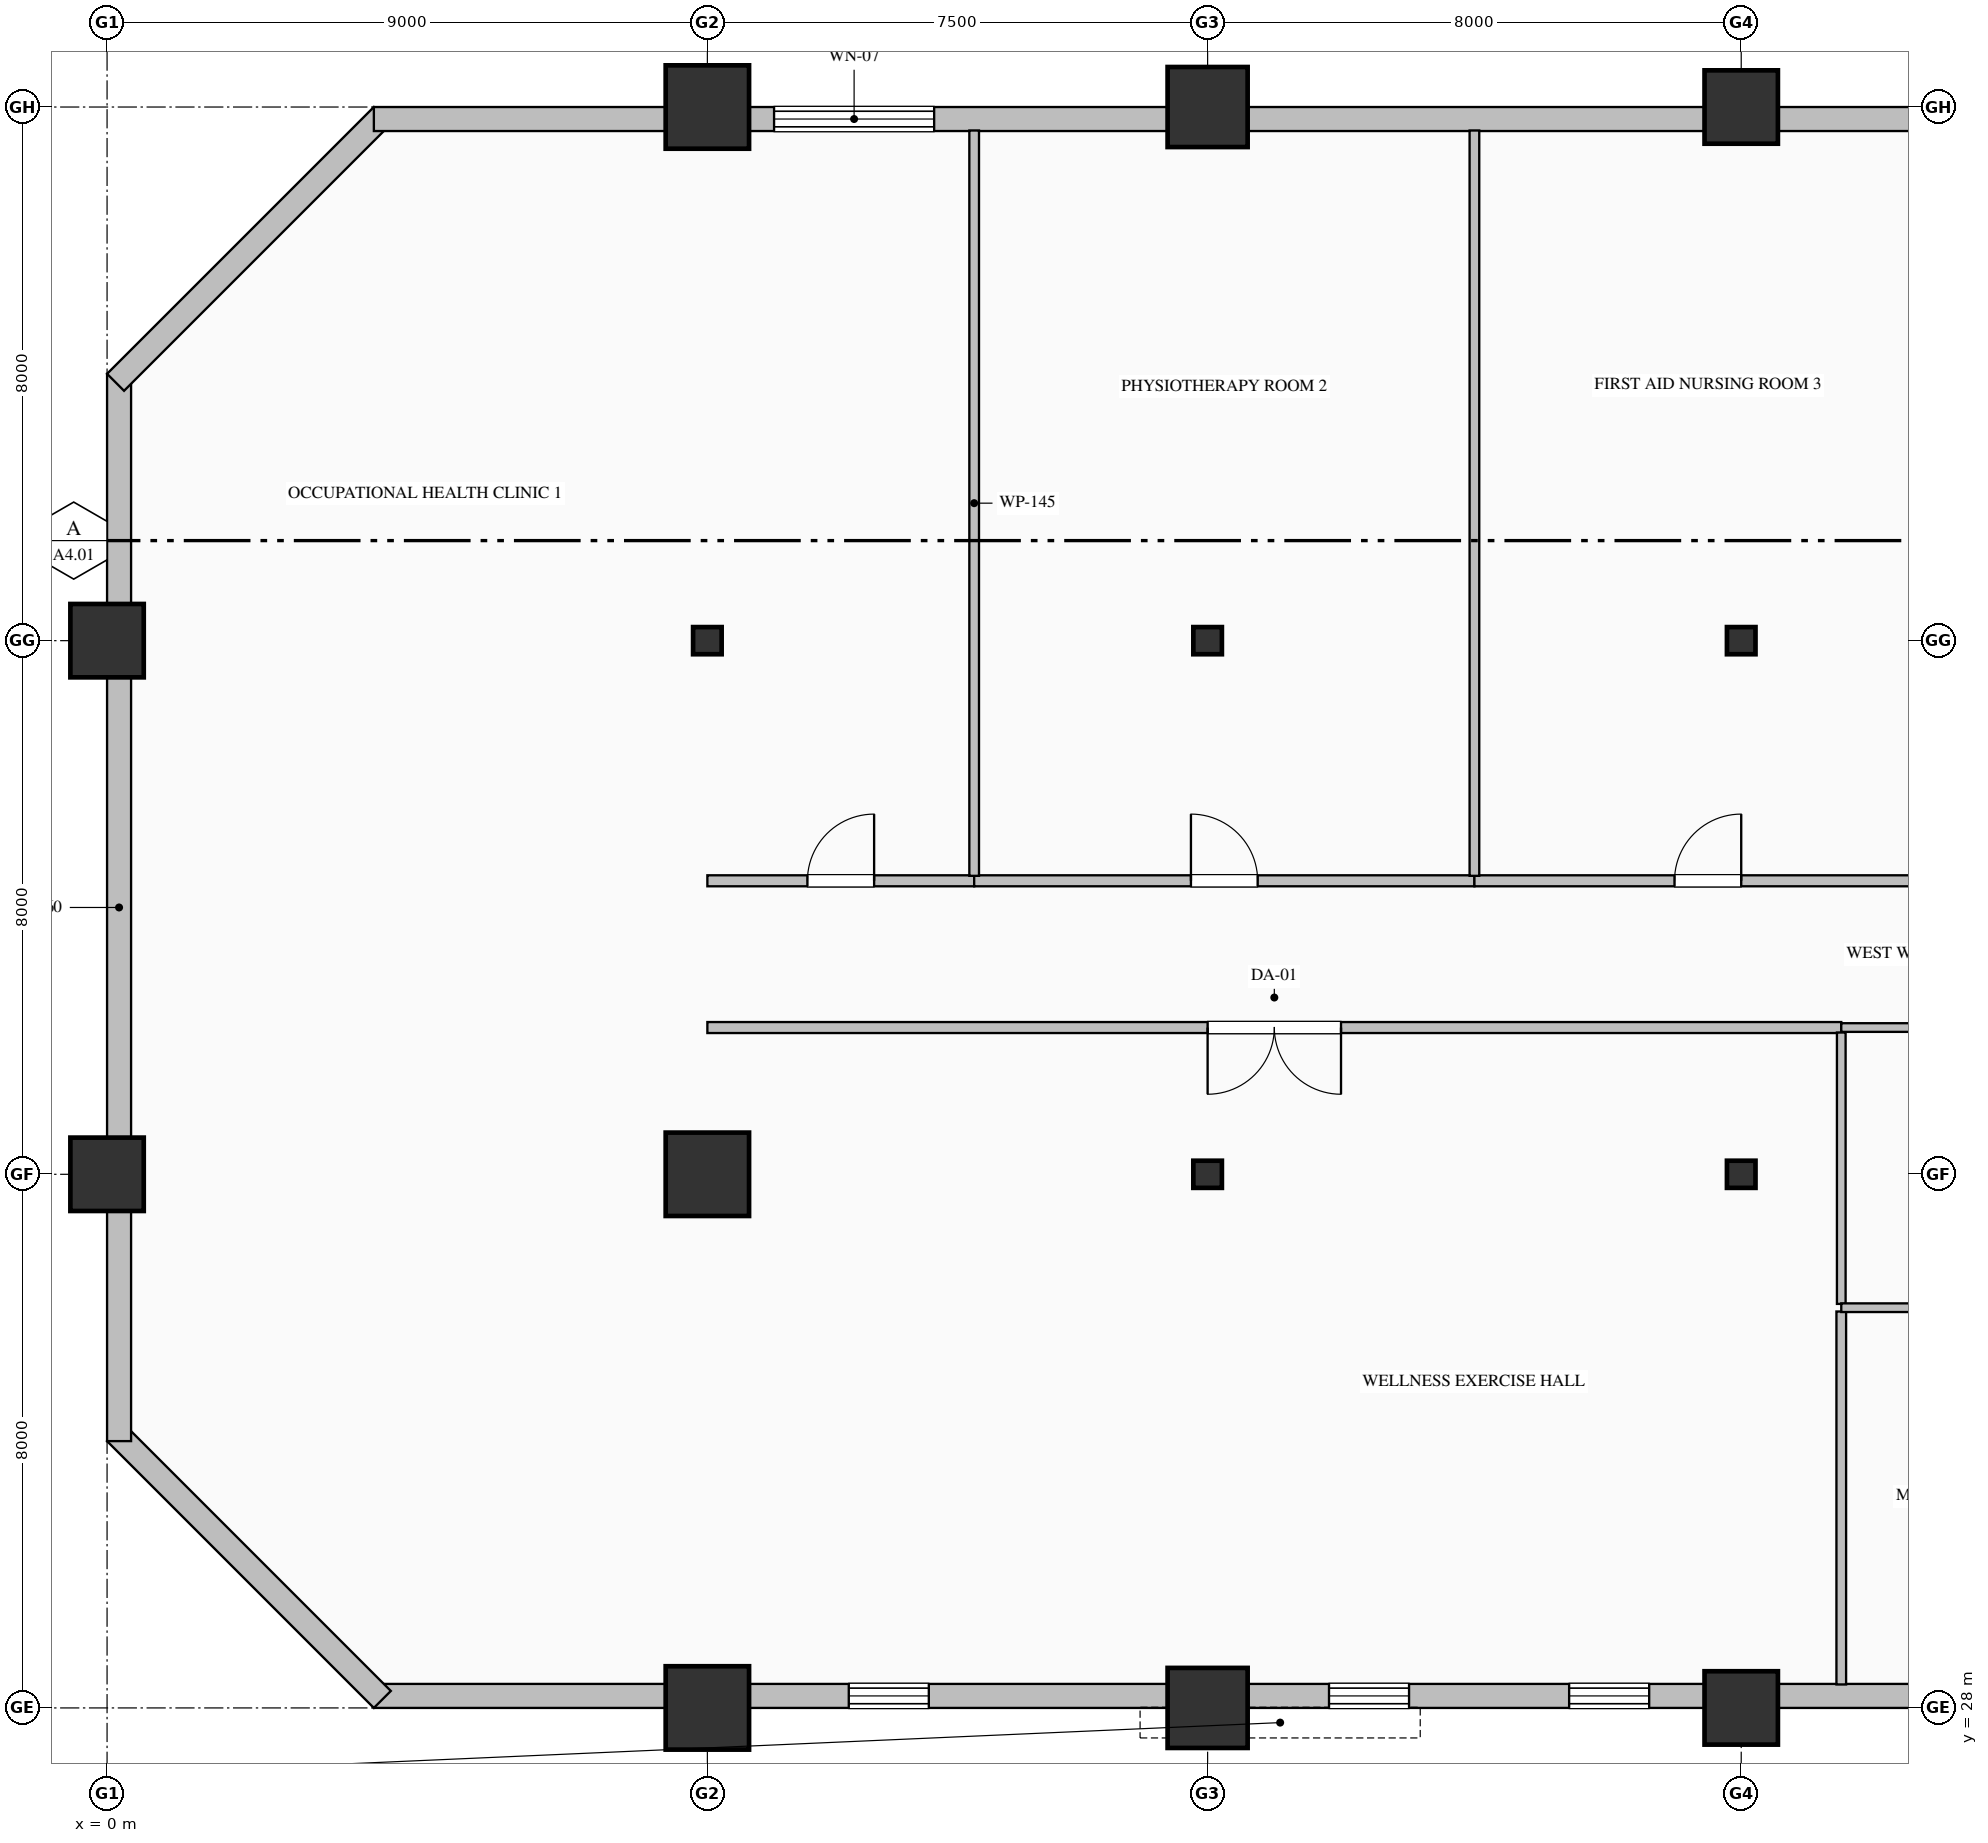
"""IFC4 building model, lengths in metres.
Left out: names, types, materials, properties, quantities, classifications, styles, units other than length and angle.
Written with IfcOpenShell. Run it as: python <this file> out.ifc"""

import sys

from ifc_helpers import new_model, si_unit, direction, frame, frame_2d, origin, origin_2d, place, context, subcontext, project, spatial, rectangle, hollow_rectangle, hollow_circle, i_section, extrude, element, fill, save


model = new_model("IFC4")
c1 = context("Model", 3, precision=1e-05, world=origin(), true_north=direction((0.0, 1.0)))
c2 = subcontext(c1, "Body", "Model", "MODEL_VIEW")
j1 = project(units=[si_unit("LENGTHUNIT", "METRE"), si_unit("PLANEANGLEUNIT", "RADIAN")], contexts=[c1])
p1 = place(None, origin())
s1 = spatial("IfcSite", under=j1, at=p1, CompositionType="ELEMENT")
p2 = place(p1, origin())
s2 = spatial("IfcBuilding", under=s1, at=p2, CompositionType="ELEMENT")
p3 = place(p2, frame((0.0, 0.0, 84.2)))
s3 = spatial("IfcBuildingStorey", under=s2, at=p3, CompositionType="ELEMENT", Elevation=84.2)
for number, where, z_axis, x_axis in (
    (1, (0.0, 36.0, 0.0), (0.0, 0.0, 1.0), (1.0, 0.0, 0.0)),
    (2, (0.0, 44.0, 0.0), (0.0, 0.0, 1.0), (1.0, 0.0, 0.0)),
):
    element("IfcColumn", number, at=place(p3, frame(where, z_axis=z_axis, x_axis=x_axis)), inside=s3, PredefinedType="COLUMN", context=c2, shape_type="SweptSolid", body=[
        extrude(hollow_rectangle(XDim=1.1, YDim=1.1, WallThickness=0.04, at=origin_2d()), origin(), (0.0, 0.0, 1.0), 4.0),
    ])
for number, where, z_axis, x_axis in (
    (3, (9.0, 28.0, 0.0), (0.0, 0.0, 1.0), (1.0, 0.0, 0.0)),
    (4, (9.0, 36.0, 0.0), (0.0, 0.0, 1.0), (1.0, 0.0, 0.0)),
):
    element("IfcColumn", number, at=place(p3, frame(where, z_axis=z_axis, x_axis=x_axis)), inside=s3, PredefinedType="COLUMN", context=c2, shape_type="SweptSolid", body=[
        extrude(hollow_rectangle(XDim=1.25, YDim=1.25, WallThickness=0.045, at=origin_2d()), origin(), (0.0, 0.0, 1.0), 4.0),
    ])
p4 = place(p3, frame((9.0, 44.0, 0.0), z_axis=(0.0, 0.0, 1.0), x_axis=(1.0, 0.0, 0.0)))
e5 = element("IfcColumn", 5, at=p4, inside=s3, PredefinedType="COLUMN", context=c2, shape_type="SweptSolid", body=[
    extrude(i_section(OverallWidth=0.407, OverallDepth=0.428, WebThickness=0.02, FlangeThickness=0.035, FilletRadius=0.022, at=origin_2d()), origin(), (0.0, 0.0, 1.0), 4.0),
])
p5 = place(p3, frame((9.0, 52.0, 0.0), z_axis=(0.0, 0.0, 1.0), x_axis=(1.0, 0.0, 0.0)))
e6 = element("IfcColumn", 6, at=p5, inside=s3, PredefinedType="COLUMN", context=c2, shape_type="SweptSolid", body=[
    extrude(hollow_rectangle(XDim=1.25, YDim=1.25, WallThickness=0.045, at=origin_2d()), origin(), (0.0, 0.0, 1.0), 4.0),
])
p6 = place(p3, frame((16.5, 28.0, 0.0), z_axis=(0.0, 0.0, 1.0), x_axis=(1.0, 0.0, 0.0)))
e7 = element("IfcColumn", 7, at=p6, inside=s3, PredefinedType="COLUMN", context=c2, shape_type="SweptSolid", body=[
    extrude(hollow_circle(Radius=0.6, WallThickness=0.04, at=origin_2d()), origin(), (0.0, 0.0, 1.0), 4.0),
])
for number, where, z_axis, x_axis in (
    (8, (16.5, 36.0, 0.0), (0.0, 0.0, 1.0), (1.0, 0.0, 0.0)),
    (9, (16.5, 44.0, 0.0), (0.0, 0.0, 1.0), (1.0, 0.0, 0.0)),
):
    element("IfcColumn", number, at=place(p3, frame(where, z_axis=z_axis, x_axis=x_axis)), inside=s3, PredefinedType="COLUMN", context=c2, shape_type="SweptSolid", body=[
        extrude(i_section(OverallWidth=0.407, OverallDepth=0.428, WebThickness=0.02, FlangeThickness=0.035, FilletRadius=0.022, at=origin_2d()), origin(), (0.0, 0.0, 1.0), 4.0),
    ])
p7 = place(p3, frame((16.5, 52.0, 0.0), z_axis=(0.0, 0.0, 1.0), x_axis=(1.0, 0.0, 0.0)))
e10 = element("IfcColumn", 10, at=p7, inside=s3, PredefinedType="COLUMN", context=c2, shape_type="SweptSolid", body=[
    extrude(hollow_circle(Radius=0.6, WallThickness=0.04, at=origin_2d()), origin(), (0.0, 0.0, 1.0), 4.0),
])
p8 = place(p3, frame((24.5, 28.0, 0.0), z_axis=(0.0, 0.0, 1.0), x_axis=(1.0, 0.0, 0.0)))
e11 = element("IfcColumn", 11, at=p8, inside=s3, PredefinedType="COLUMN", context=c2, shape_type="SweptSolid", body=[
    extrude(hollow_rectangle(XDim=1.1, YDim=1.1, WallThickness=0.04, at=origin_2d()), origin(), (0.0, 0.0, 1.0), 4.0),
])
for number, where, z_axis, x_axis in (
    (12, (24.5, 36.0, 0.0), (0.0, 0.0, 1.0), (1.0, 0.0, 0.0)),
    (13, (24.5, 44.0, 0.0), (0.0, 0.0, 1.0), (1.0, 0.0, 0.0)),
):
    element("IfcColumn", number, at=place(p3, frame(where, z_axis=z_axis, x_axis=x_axis)), inside=s3, PredefinedType="COLUMN", context=c2, shape_type="SweptSolid", body=[
        extrude(i_section(OverallWidth=0.407, OverallDepth=0.428, WebThickness=0.02, FlangeThickness=0.035, FilletRadius=0.022, at=origin_2d()), origin(), (0.0, 0.0, 1.0), 4.0),
    ])
p9 = place(p3, frame((24.5, 52.0, 0.0), z_axis=(0.0, 0.0, 1.0), x_axis=(1.0, 0.0, 0.0)))
e14 = element("IfcColumn", 14, at=p9, inside=s3, PredefinedType="COLUMN", context=c2, shape_type="SweptSolid", body=[
    extrude(hollow_rectangle(XDim=1.1, YDim=1.1, WallThickness=0.04, at=origin_2d()), origin(), (0.0, 0.0, 1.0), 4.0),
])
p10 = place(p3, frame((40.52, 28.18, 0.0), z_axis=(0.0, 0.0, 1.0), x_axis=(-1.0, 0.0, 0.0)))
e15 = element("IfcWall", 15, at=p10, inside=s3, PredefinedType="SOLIDWALL", context=c2, shape_type="SweptSolid", body=[
    extrude(rectangle(XDim=36.52, YDim=0.36, at=frame_2d((18.26, 0.0))), origin(), (0.0, 0.0, 1.0), 3.05),
])
p11 = place(p10, frame((10.2, 0.0, 0.7)))
e16 = element("IfcOpeningElement", 16, at=p11, cuts=e15, PredefinedType="OPENING", context=c2, shape_type="SweptSolid", body=[
    extrude(rectangle(XDim=1.2, YDim=1.85, at=frame_2d((0.6, 0.925))), frame((0.0, 0.19, 0.0), z_axis=(0.0, -1.0, 0.0), x_axis=(1.0, 0.0, 0.0)), (0.0, 0.0, 1.0), 0.38),
])
p12 = place(p10, frame((17.4, 0.0, 0.7)))
e17 = element("IfcOpeningElement", 17, at=p12, cuts=e15, PredefinedType="OPENING", context=c2, shape_type="SweptSolid", body=[
    extrude(rectangle(XDim=1.2, YDim=1.85, at=frame_2d((0.6, 0.925))), frame((0.0, 0.19, 0.0), z_axis=(0.0, -1.0, 0.0), x_axis=(1.0, 0.0, 0.0)), (0.0, 0.0, 1.0), 0.38),
])
p13 = place(p10, frame((21.0, 0.0, 0.7)))
e18 = element("IfcOpeningElement", 18, at=p13, cuts=e15, PredefinedType="OPENING", context=c2, shape_type="SweptSolid", body=[
    extrude(rectangle(XDim=1.2, YDim=1.85, at=frame_2d((0.6, 0.925))), frame((0.0, 0.19, 0.0), z_axis=(0.0, -1.0, 0.0), x_axis=(1.0, 0.0, 0.0)), (0.0, 0.0, 1.0), 0.38),
])
p14 = place(p10, frame((28.2, 0.0, 0.7)))
e19 = element("IfcOpeningElement", 19, at=p14, cuts=e15, PredefinedType="OPENING", context=c2, shape_type="SweptSolid", body=[
    extrude(rectangle(XDim=1.2, YDim=1.85, at=frame_2d((0.6, 0.925))), frame((0.0, 0.19, 0.0), z_axis=(0.0, -1.0, 0.0), x_axis=(1.0, 0.0, 0.0)), (0.0, 0.0, 1.0), 0.38),
])
p15 = place(p3, frame((4.127, 28.127, 0.0), z_axis=(0.0, 0.0, 1.0), x_axis=(-0.707106781187, 0.707106781187, 0.0)))
e20 = element("IfcWall", 20, at=p15, inside=s3, PredefinedType="SOLIDWALL", context=c2, shape_type="SweptSolid", body=[
    extrude(rectangle(XDim=5.657, YDim=0.36, at=frame_2d((2.828, 0.0))), origin(), (0.0, 0.0, 1.0), 3.75),
])
p16 = place(p3, frame((0.18, 32.0, 0.0), z_axis=(0.0, 0.0, 1.0), x_axis=(0.0, 1.0, 0.0)))
e21 = element("IfcWall", 21, at=p16, inside=s3, PredefinedType="SOLIDWALL", context=c2, shape_type="SweptSolid", body=[
    extrude(rectangle(XDim=16.0, YDim=0.36, at=frame_2d((8.0, 0.0))), origin(), (0.0, 0.0, 1.0), 3.25),
])
p17 = place(p3, frame((0.127, 47.873, 0.0), z_axis=(0.0, 0.0, 1.0), x_axis=(0.707106781187, 0.707106781187, 0.0)))
e22 = element("IfcWall", 22, at=p17, inside=s3, PredefinedType="SOLIDWALL", context=c2, shape_type="SweptSolid", body=[
    extrude(rectangle(XDim=5.657, YDim=0.36, at=frame_2d((2.828, 0.0))), origin(), (0.0, 0.0, 1.0), 3.75),
])
p18 = place(p3, frame((4.0, 51.82, 0.0), z_axis=(0.0, 0.0, 1.0), x_axis=(1.0, 0.0, 0.0)))
e23 = element("IfcWall", 23, at=p18, inside=s3, PredefinedType="SOLIDWALL", context=c2, shape_type="SweptSolid", body=[
    extrude(rectangle(XDim=36.52, YDim=0.36, at=frame_2d((18.26, 0.0))), origin(), (0.0, 0.0, 1.0), 3.25),
])
p19 = place(p18, frame((6.0, 0.0, 0.8)))
e24 = element("IfcOpeningElement", 24, at=p19, cuts=e23, PredefinedType="OPENING", context=c2, shape_type="SweptSolid", body=[
    extrude(rectangle(XDim=2.4, YDim=2.15, at=frame_2d((1.2, 1.075))), frame((0.0, 0.19, 0.0), z_axis=(0.0, -1.0, 0.0), x_axis=(1.0, 0.0, 0.0)), (0.0, 0.0, 1.0), 0.38),
])
p20 = place(p18, frame((24.15, 0.0, 0.85)))
e25 = element("IfcOpeningElement", 25, at=p20, cuts=e23, PredefinedType="OPENING", context=c2, shape_type="SweptSolid", body=[
    extrude(rectangle(XDim=2.1, YDim=2.05, at=frame_2d((1.05, 1.025))), frame((0.0, 0.19, 0.0), z_axis=(0.0, -1.0, 0.0), x_axis=(1.0, 0.0, 0.0)), (0.0, 0.0, 1.0), 0.38),
])
p21 = place(p3, frame((9.0, 40.4, 0.0), z_axis=(0.0, 0.0, 1.0), x_axis=(1.0, 0.0, 0.0)))
e26 = element("IfcWall", 26, at=p21, inside=s3, PredefinedType="PARTITIONING", context=c2, shape_type="SweptSolid", body=[
    extrude(rectangle(XDim=4.0, YDim=0.165, at=frame_2d((2.0, 0.0))), origin(), (0.0, 0.0, 1.0), 3.75),
])
p22 = place(p21, frame((1.5, 0.0, 0.0)))
e27 = element("IfcOpeningElement", 27, at=p22, cuts=e26, PredefinedType="OPENING", context=c2, shape_type="SweptSolid", body=[
    extrude(rectangle(XDim=1.0, YDim=2.15, at=frame_2d((0.5, 1.075))), frame((0.0, 0.093, 0.0), z_axis=(0.0, -1.0, 0.0), x_axis=(1.0, 0.0, 0.0)), (0.0, 0.0, 1.0), 0.185),
])
p23 = place(p3, frame((13.0, 40.4, 0.0), z_axis=(0.0, 0.0, 1.0), x_axis=(1.0, 0.0, 0.0)))
e28 = element("IfcWall", 28, at=p23, inside=s3, PredefinedType="PARTITIONING", context=c2, shape_type="SweptSolid", body=[
    extrude(rectangle(XDim=7.5, YDim=0.165, at=frame_2d((3.75, 0.0))), origin(), (0.0, 0.0, 1.0), 3.75),
])
p24 = place(p23, frame((3.25, 0.0, 0.0)))
e29 = element("IfcOpeningElement", 29, at=p24, cuts=e28, PredefinedType="OPENING", context=c2, shape_type="SweptSolid", body=[
    extrude(rectangle(XDim=1.0, YDim=2.15, at=frame_2d((0.5, 1.075))), frame((0.0, 0.093, 0.0), z_axis=(0.0, -1.0, 0.0), x_axis=(1.0, 0.0, 0.0)), (0.0, 0.0, 1.0), 0.185),
])
p25 = place(p3, frame((20.5, 40.4, 0.0), z_axis=(0.0, 0.0, 1.0), x_axis=(1.0, 0.0, 0.0)))
e30 = element("IfcWall", 30, at=p25, inside=s3, PredefinedType="PARTITIONING", context=c2, shape_type="SweptSolid", body=[
    extrude(rectangle(XDim=7.0, YDim=0.165, at=frame_2d((3.5, 0.0))), origin(), (0.0, 0.0, 1.0), 3.75),
])
p26 = place(p25, frame((3.0, 0.0, 0.0)))
e31 = element("IfcOpeningElement", 31, at=p26, cuts=e30, PredefinedType="OPENING", context=c2, shape_type="SweptSolid", body=[
    extrude(rectangle(XDim=1.0, YDim=2.15, at=frame_2d((0.5, 1.075))), frame((0.0, 0.093, 0.0), z_axis=(0.0, -1.0, 0.0), x_axis=(1.0, 0.0, 0.0)), (0.0, 0.0, 1.0), 0.185),
])
p27 = place(p3, frame((26.0, 38.2, 0.0), z_axis=(0.0, 0.0, 1.0), x_axis=(-1.0, 0.0, 0.0)))
e32 = element("IfcWall", 32, at=p27, inside=s3, PredefinedType="PARTITIONING", context=c2, shape_type="SweptSolid", body=[
    extrude(rectangle(XDim=17.0, YDim=0.165, at=frame_2d((8.5, 0.0))), origin(), (0.0, 0.0, 1.0), 3.75),
])
p28 = place(p27, frame((7.5, 0.0, 0.0)))
e33 = element("IfcOpeningElement", 33, at=p28, cuts=e32, PredefinedType="OPENING", context=c2, shape_type="SweptSolid", body=[
    extrude(rectangle(XDim=2.0, YDim=2.4, at=frame_2d((1.0, 1.2))), frame((0.0, 0.093, 0.0), z_axis=(0.0, -1.0, 0.0), x_axis=(1.0, 0.0, 0.0)), (0.0, 0.0, 1.0), 0.185),
])
p29 = place(p3, frame((37.8, 38.2, 0.0), z_axis=(0.0, 0.0, 1.0), x_axis=(-1.0, 0.0, 0.0)))
e34 = element("IfcWall", 34, at=p29, inside=s3, PredefinedType="PARTITIONING", context=c2, shape_type="SweptSolid", body=[
    extrude(rectangle(XDim=11.8, YDim=0.13, at=frame_2d((5.9, 0.0))), origin(), (0.0, 0.0, 1.0), 3.75),
])
p30 = place(p29, frame((5.4, 0.0, 0.0)))
e35 = element("IfcOpeningElement", 35, at=p30, cuts=e34, PredefinedType="OPENING", context=c2, shape_type="SweptSolid", body=[
    extrude(rectangle(XDim=1.0, YDim=2.15, at=frame_2d((0.5, 1.075))), frame((0.0, 0.075, 0.0), z_axis=(0.0, -1.0, 0.0), x_axis=(1.0, 0.0, 0.0)), (0.0, 0.0, 1.0), 0.15),
])
for number, where, z_axis, x_axis in (
    (36, (13.0, 51.648, 0.0), (0.0, 0.0, 1.0), (0.0, -1.0, 0.0)),
    (37, (20.5, 51.648, 0.0), (0.0, 0.0, 1.0), (0.0, -1.0, 0.0)),
):
    element("IfcWall", number, at=place(p3, frame(where, z_axis=z_axis, x_axis=x_axis)), inside=s3, PredefinedType="PARTITIONING", context=c2, shape_type="SweptSolid", body=[
        extrude(rectangle(XDim=11.173, YDim=0.145, at=frame_2d((5.587, 0.0))), origin(), (0.0, 0.0, 1.0), 3.75),
    ])
p31 = place(p3, frame((26.0, 33.943, 0.0), z_axis=(0.0, 0.0, 1.0), x_axis=(0.0, -1.0, 0.0)))
e38 = element("IfcWall", 38, at=p31, inside=s3, PredefinedType="PARTITIONING", context=c2, shape_type="SweptSolid", body=[
    extrude(rectangle(XDim=5.591, YDim=0.145, at=frame_2d((2.795, 0.0))), origin(), (0.0, 0.0, 1.0), 3.75),
])
p32 = place(p3, frame((26.0, 38.125, 0.0), z_axis=(0.0, 0.0, 1.0), x_axis=(0.0, -1.0, 0.0)))
e39 = element("IfcWall", 39, at=p32, inside=s3, PredefinedType="PARTITIONING", context=c2, shape_type="SweptSolid", body=[
    extrude(rectangle(XDim=4.069, YDim=0.13, at=frame_2d((2.034, 0.0))), origin(), (0.0, 0.0, 1.0), 3.75),
])
p33 = place(p3, frame((26.0, 34.0, 0.0), z_axis=(0.0, 0.0, 1.0), x_axis=(1.0, 0.0, 0.0)))
e40 = element("IfcWall", 40, at=p33, inside=s3, PredefinedType="PARTITIONING", context=c2, shape_type="SweptSolid", body=[
    extrude(rectangle(XDim=11.8, YDim=0.13, at=frame_2d((5.9, 0.0))), origin(), (0.0, 0.0, 1.0), 3.75),
])
p34 = place(p12, origin())
e41 = element("IfcWindow", 41, at=p34, inside=s3, PartitioningType="DOUBLE_PANEL_VERTICAL", PredefinedType="WINDOW", context=c2, shape_type="SweptSolid", body=[
    extrude(rectangle(XDim=1.2, YDim=1.85, at=frame_2d((0.6, 0.925))), frame((0.0, 0.15, 0.0), z_axis=(0.0, -1.0, 0.0), x_axis=(1.0, 0.0, 0.0)), (0.0, 0.0, 1.0), 0.06),
])
fill(e17, e41)
p35 = place(p13, origin())
e42 = element("IfcWindow", 42, at=p35, inside=s3, PartitioningType="DOUBLE_PANEL_VERTICAL", PredefinedType="WINDOW", context=c2, shape_type="SweptSolid", body=[
    extrude(rectangle(XDim=1.2, YDim=1.85, at=frame_2d((0.6, 0.925))), frame((0.0, 0.15, 0.0), z_axis=(0.0, -1.0, 0.0), x_axis=(1.0, 0.0, 0.0)), (0.0, 0.0, 1.0), 0.06),
])
fill(e18, e42)
p36 = place(p14, origin())
e43 = element("IfcWindow", 43, at=p36, inside=s3, PartitioningType="DOUBLE_PANEL_VERTICAL", PredefinedType="WINDOW", context=c2, shape_type="SweptSolid", body=[
    extrude(rectangle(XDim=1.2, YDim=1.85, at=frame_2d((0.6, 0.925))), frame((0.0, 0.15, 0.0), z_axis=(0.0, -1.0, 0.0), x_axis=(1.0, 0.0, 0.0)), (0.0, 0.0, 1.0), 0.06),
])
fill(e19, e43)
p37 = place(p19, origin())
e44 = element("IfcWindow", 44, at=p37, inside=s3, PartitioningType="TRIPLE_PANEL_VERTICAL", PredefinedType="WINDOW", context=c2, shape_type="SweptSolid", body=[
    extrude(rectangle(XDim=2.4, YDim=2.15, at=frame_2d((1.2, 1.075))), frame((0.0, 0.15, 0.0), z_axis=(0.0, -1.0, 0.0), x_axis=(1.0, 0.0, 0.0)), (0.0, 0.0, 1.0), 0.06),
])
fill(e24, e44)
p38 = place(p22, origin())
e45 = element("IfcDoor", 45, at=p38, inside=s3, OperationType="SINGLE_SWING_RIGHT", PredefinedType="DOOR", context=c2, shape_type="SweptSolid", body=[
    extrude(rectangle(XDim=1.0, YDim=2.15, at=frame_2d((0.5, 1.075))), frame((0.0, 0.025, 0.0), z_axis=(0.0, -1.0, 0.0), x_axis=(1.0, 0.0, 0.0)), (0.0, 0.0, 1.0), 0.05),
])
fill(e27, e45)
p39 = place(p24, origin())
e46 = element("IfcDoor", 46, at=p39, inside=s3, OperationType="SINGLE_SWING_LEFT", PredefinedType="DOOR", context=c2, shape_type="SweptSolid", body=[
    extrude(rectangle(XDim=1.0, YDim=2.15, at=frame_2d((0.5, 1.075))), frame((0.0, 0.025, 0.0), z_axis=(0.0, -1.0, 0.0), x_axis=(1.0, 0.0, 0.0)), (0.0, 0.0, 1.0), 0.05),
])
fill(e29, e46)
p40 = place(p26, origin())
e47 = element("IfcDoor", 47, at=p40, inside=s3, OperationType="SINGLE_SWING_RIGHT", PredefinedType="DOOR", context=c2, shape_type="SweptSolid", body=[
    extrude(rectangle(XDim=1.0, YDim=2.15, at=frame_2d((0.5, 1.075))), frame((0.0, 0.025, 0.0), z_axis=(0.0, -1.0, 0.0), x_axis=(1.0, 0.0, 0.0)), (0.0, 0.0, 1.0), 0.05),
])
fill(e31, e47)
p41 = place(p28, origin())
e48 = element("IfcDoor", 48, at=p41, inside=s3, OperationType="DOUBLE_DOOR_SINGLE_SWING", PredefinedType="DOOR", context=c2, shape_type="SweptSolid", body=[
    extrude(rectangle(XDim=2.0, YDim=2.4, at=frame_2d((1.0, 1.2))), frame((0.0, 0.025, 0.0), z_axis=(0.0, -1.0, 0.0), x_axis=(1.0, 0.0, 0.0)), (0.0, 0.0, 1.0), 0.05),
])
fill(e33, e48)
save(model, sys.argv[1])
